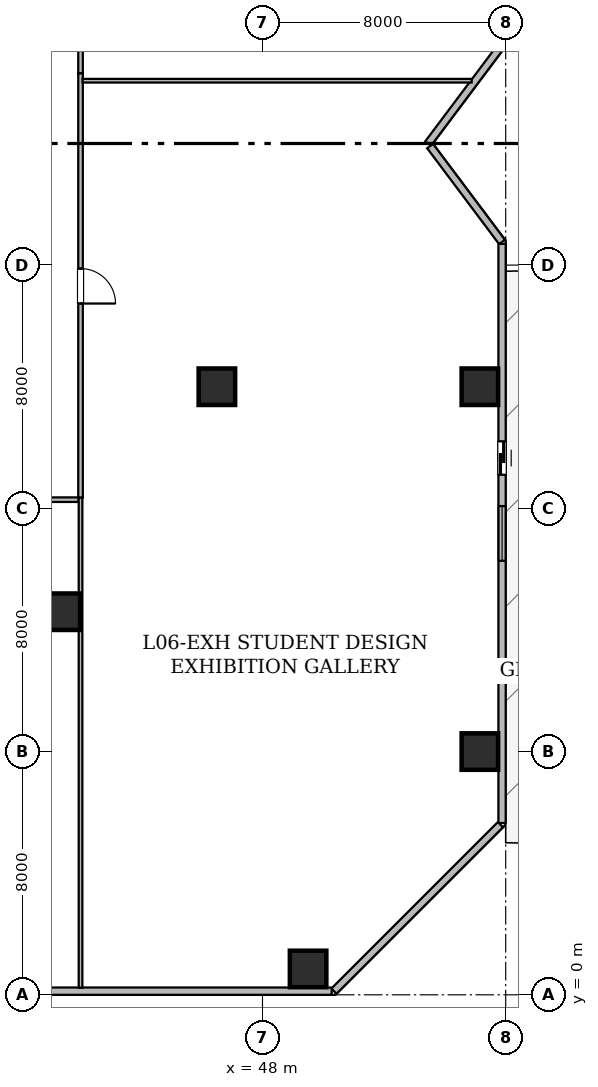
"""IFC4 building model, lengths in metres.
Left out: names, types, materials, properties, quantities, classifications, styles, units other than length and angle.
Written with IfcOpenShell. Run it as: python <this file> out.ifc"""

import sys

from ifc_helpers import new_model, si_unit, direction, frame, frame_2d, origin, origin_2d, place, context, subcontext, project, spatial, rectangle, hollow_rectangle, extrude, element, fill, save


model = new_model("IFC4")
c1 = context("Model", 3, precision=1e-05, world=origin(), true_north=direction((0.0, 1.0)))
c2 = subcontext(c1, "Body", "Model", "MODEL_VIEW")
j1 = project(units=[si_unit("LENGTHUNIT", "METRE"), si_unit("PLANEANGLEUNIT", "RADIAN")], contexts=[c1])
p1 = place(None, origin())
s1 = spatial("IfcSite", under=j1, at=p1, CompositionType="ELEMENT")
p2 = place(p1, origin())
s2 = spatial("IfcBuilding", under=s1, at=p2, CompositionType="ELEMENT")
p3 = place(p2, frame((0.0, 0.0, 28.8)))
s3 = spatial("IfcBuildingStorey", under=s2, at=p3, CompositionType="ELEMENT", Elevation=28.8)
for number, where, z_axis, x_axis in (
    (1, (49.5, 0.85, 0.0), (0.0, 0.0, 1.0), (1.0, 0.0, 0.0)),
    (2, (55.15, 8.0, 0.0), (0.0, 0.0, 1.0), (1.0, 0.0, 0.0)),
    (3, (55.15, 20.0, 0.0), (0.0, 0.0, 1.0), (1.0, 0.0, 0.0)),
    (4, (41.4, 12.6, 0.0), (0.0, 0.0, 1.0), (1.0, 0.0, 0.0)),
    (5, (46.5, 20.0, 0.0), (0.0, 0.0, 1.0), (1.0, 0.0, 0.0)),
):
    element("IfcColumn", number, at=place(p3, frame(where, z_axis=z_axis, x_axis=x_axis)), inside=s3, PredefinedType="COLUMN", context=c2, shape_type="SweptSolid", body=[
        extrude(hollow_rectangle(XDim=1.2, YDim=1.2, WallThickness=0.06, at=origin_2d()), origin(), (0.0, 0.0, 1.0), 4.475),
    ])
p4 = place(p3, frame((55.842, 31.189, 0.0), z_axis=(0.0, 0.0, 1.0), x_axis=(-0.600058791648, -0.799955902889, 0.0)))
e6 = element("IfcWall", 6, at=p4, inside=s3, PredefinedType="STANDARD", context=c2, shape_type="SweptSolid", body=[
    extrude(rectangle(XDim=3.986, YDim=0.24, at=frame_2d((1.993, 0.0))), origin(), (0.0, 0.0, 1.0), 4.08),
])
p5 = place(p3, frame((53.513, 27.916, 0.0), z_axis=(0.0, 0.0, 1.0), x_axis=(0.599990098106, -0.800007426325, 0.0)))
e7 = element("IfcWall", 7, at=p5, inside=s3, PredefinedType="STANDARD", context=c2, shape_type="SweptSolid", body=[
    extrude(rectangle(XDim=3.945, YDim=0.24, at=frame_2d((1.973, 0.0))), origin(), (0.0, 0.0, 1.0), 4.08),
])
p6 = place(p3, frame((55.88, 24.698, 0.0), z_axis=(0.0, 0.0, 1.0), x_axis=(0.0, -1.0, 0.0)))
e8 = element("IfcWall", 8, at=p6, inside=s3, PredefinedType="STANDARD", context=c2, shape_type="SweptSolid", body=[
    extrude(rectangle(XDim=19.048, YDim=0.24, at=frame_2d((9.524, 0.0))), origin(), (0.0, 0.0, 1.0), 4.08),
])
p7 = place(p6, frame((6.494, 0.0, 0.0)))
e9 = element("IfcOpeningElement", 9, at=p7, cuts=e8, PredefinedType="OPENING", context=c2, shape_type="SweptSolid", body=[
    extrude(rectangle(XDim=1.1, YDim=2.2, at=frame_2d((0.55, 1.1))), frame((0.0, 0.13, 0.0), z_axis=(0.0, -1.0, 0.0), x_axis=(1.0, 0.0, 0.0)), (0.0, 0.0, 1.0), 0.26),
])
p8 = place(p6, frame((8.624, 0.0, 0.85)))
e10 = element("IfcOpeningElement", 10, at=p8, cuts=e8, PredefinedType="OPENING", context=c2, shape_type="SweptSolid", body=[
    extrude(rectangle(XDim=1.8, YDim=0.92, at=frame_2d((0.9, 0.46))), frame((0.0, 0.13, 0.0), z_axis=(0.0, -1.0, 0.0), x_axis=(1.0, 0.0, 0.0)), (0.0, 0.0, 1.0), 0.26),
])
p9 = place(p3, frame((55.826, 5.596, 0.0), z_axis=(0.0, 0.0, 1.0), x_axis=(-0.707106781187, -0.707106781187, 0.0)))
e11 = element("IfcWall", 11, at=p9, inside=s3, PredefinedType="STANDARD", context=c2, shape_type="SweptSolid", body=[
    extrude(rectangle(XDim=7.744, YDim=0.24, at=frame_2d((3.872, 0.0))), origin(), (0.0, 0.0, 1.0), 4.08),
])
p10 = place(p3, frame((50.275, 0.12, 0.0), z_axis=(0.0, 0.0, 1.0), x_axis=(-1.0, 0.0, 0.0)))
e12 = element("IfcWall", 12, at=p10, inside=s3, PredefinedType="STANDARD", context=c2, shape_type="SweptSolid", body=[
    extrude(rectangle(XDim=44.55, YDim=0.24, at=frame_2d((22.275, 0.0))), origin(), (0.0, 0.0, 1.0), 4.08),
])
p11 = place(p10, frame((15.275, 0.0, 0.85)))
e13 = element("IfcOpeningElement", 13, at=p11, cuts=e12, PredefinedType="OPENING", context=c2, shape_type="SweptSolid", body=[
    extrude(rectangle(XDim=1.8, YDim=0.92, at=frame_2d((0.9, 0.46))), frame((0.0, 0.13, 0.0), z_axis=(0.0, -1.0, 0.0), x_axis=(1.0, 0.0, 0.0)), (0.0, 0.0, 1.0), 0.26),
])
p12 = place(p3, frame((42.015, 30.314, 0.0), z_axis=(0.0, 0.0, 1.0), x_axis=(0.0, -1.0, 0.0)))
e14 = element("IfcWall", 14, at=p12, inside=s3, PredefinedType="STANDARD", context=c2, shape_type="SweptSolid", body=[
    extrude(rectangle(XDim=13.964, YDim=0.15, at=frame_2d((6.982, 0.0))), origin(), (0.0, 0.0, 1.0), 2.67),
])
p13 = place(p12, frame((6.428, 0.0, 0.0)))
e15 = element("IfcOpeningElement", 15, at=p13, cuts=e14, PredefinedType="OPENING", context=c2, shape_type="SweptSolid", body=[
    extrude(rectangle(XDim=1.15, YDim=2.2, at=frame_2d((0.575, 1.1))), frame((0.0, 0.085, 0.0), z_axis=(0.0, -1.0, 0.0), x_axis=(1.0, 0.0, 0.0)), (0.0, 0.0, 1.0), 0.17),
])
p14 = place(p3, frame((42.015, 39.65, 0.0), z_axis=(0.0, 0.0, 1.0), x_axis=(0.0, -1.0, 0.0)))
e16 = element("IfcWall", 16, at=p14, inside=s3, PredefinedType="STANDARD", context=c2, shape_type="SweptSolid", body=[
    extrude(rectangle(XDim=9.336, YDim=0.15, at=frame_2d((4.668, 0.0))), origin(), (0.0, 0.0, 1.0), 2.67),
])
p15 = place(p14, frame((4.093, 0.0, 0.0)))
e17 = element("IfcOpeningElement", 17, at=p15, cuts=e16, PredefinedType="OPENING", context=c2, shape_type="SweptSolid", body=[
    extrude(rectangle(XDim=1.15, YDim=2.2, at=frame_2d((0.575, 1.1))), frame((0.0, 0.085, 0.0), z_axis=(0.0, -1.0, 0.0), x_axis=(1.0, 0.0, 0.0)), (0.0, 0.0, 1.0), 0.17),
])
p16 = place(p3, frame((41.95, 16.285, 0.0), z_axis=(0.0, 0.0, 1.0), x_axis=(-1.0, 0.0, 0.0)))
e18 = element("IfcWall", 18, at=p16, inside=s3, PredefinedType="STANDARD", context=c2, shape_type="SweptSolid", body=[
    extrude(rectangle(XDim=15.7, YDim=0.15, at=frame_2d((7.85, 0.0))), origin(), (0.0, 0.0, 1.0), 2.67),
])
p17 = place(p16, frame((7.4, 0.0, 0.0)))
e19 = element("IfcOpeningElement", 19, at=p17, cuts=e18, PredefinedType="OPENING", context=c2, shape_type="SweptSolid", body=[
    extrude(rectangle(XDim=0.9, YDim=2.1, at=frame_2d((0.45, 1.05))), frame((0.0, 0.085, 0.0), z_axis=(0.0, -1.0, 0.0), x_axis=(1.0, 0.0, 0.0)), (0.0, 0.0, 1.0), 0.17),
])
p18 = place(p3, frame((42.082, 30.065, 0.0), z_axis=(0.0, 0.0, 1.0), x_axis=(1.0, 0.0, 0.0)))
e20 = element("IfcWall", 20, at=p18, inside=s3, PredefinedType="PARTITIONING", context=c2, shape_type="SweptSolid", body=[
    extrude(rectangle(XDim=12.798, YDim=0.12, at=frame_2d((6.399, 0.0))), origin(), (0.0, 0.0, 1.0), 2.67),
])
p19 = place(p3, frame((42.015, 0.232, 0.0), z_axis=(0.0, 0.0, 1.0), x_axis=(0.0, 1.0, 0.0)))
e21 = element("IfcWall", 21, at=p19, inside=s3, PredefinedType="PARTITIONING", context=c2, shape_type="SweptSolid", body=[
    extrude(rectangle(XDim=16.118, YDim=0.12, at=frame_2d((8.059, 0.0))), origin(), (0.0, 0.0, 1.0), 2.67),
])
p20 = place(p7, origin())
e22 = element("IfcDoor", 22, at=p20, inside=s3, OperationType="SLIDING_TO_LEFT", PredefinedType="DOOR", context=c2, shape_type="SweptSolid", body=[
    extrude(rectangle(XDim=1.1, YDim=2.2, at=frame_2d((0.55, 1.1))), frame((0.0, 0.025, 0.0), z_axis=(0.0, -1.0, 0.0), x_axis=(1.0, 0.0, 0.0)), (0.0, 0.0, 1.0), 0.05),
])
fill(e9, e22)
p21 = place(p8, origin())
e23 = element("IfcWindow", 23, at=p21, inside=s3, PartitioningType="SINGLE_PANEL", PredefinedType="WINDOW", context=c2, shape_type="SweptSolid", body=[
    extrude(rectangle(XDim=1.8, YDim=0.92, at=frame_2d((0.9, 0.46))), frame((0.0, 0.03, 0.0), z_axis=(0.0, -1.0, 0.0), x_axis=(1.0, 0.0, 0.0)), (0.0, 0.0, 1.0), 0.06),
])
fill(e10, e23)
p22 = place(p13, origin())
e24 = element("IfcDoor", 24, at=p22, inside=s3, OperationType="SINGLE_SWING_RIGHT", PredefinedType="DOOR", context=c2, shape_type="SweptSolid", body=[
    extrude(rectangle(XDim=1.15, YDim=2.2, at=frame_2d((0.575, 1.1))), frame((0.0, 0.025, 0.0), z_axis=(0.0, -1.0, 0.0), x_axis=(1.0, 0.0, 0.0)), (0.0, 0.0, 1.0), 0.05),
])
fill(e15, e24)
save(model, sys.argv[1])
